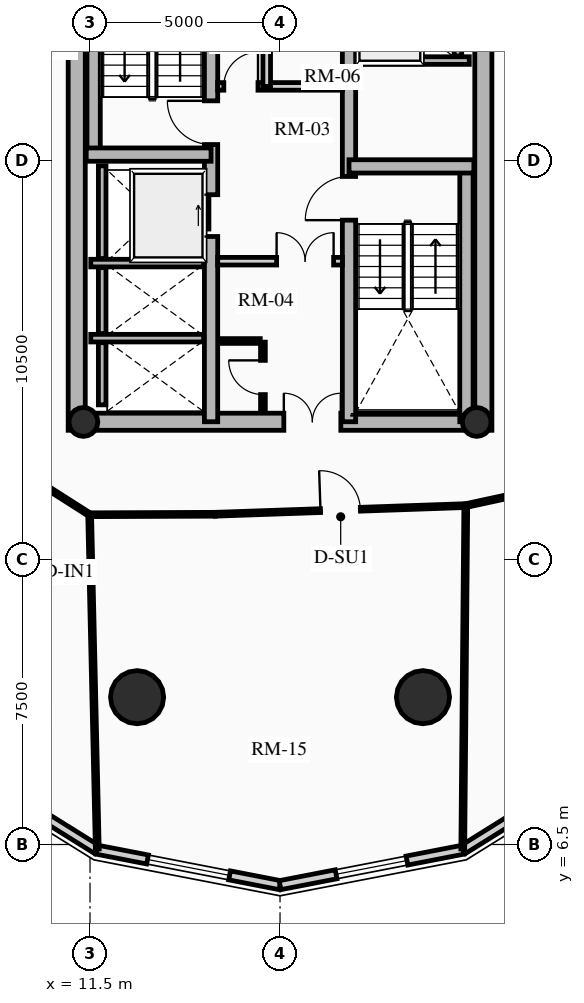
"""IFC4 building model, lengths in metres.
Left out: names, types, materials, properties, quantities, classifications, styles, units other than length and angle.
Written with IfcOpenShell. Run it as: python <this file> out.ifc"""

import sys

from ifc_helpers import new_model, si_unit, direction, frame, frame_2d, origin, origin_2d, place, context, subcontext, project, spatial, rectangle, circle, hollow_circle, extrude, source, transform, mapped, element, fill, save


model = new_model("IFC4")
c1 = context("Model", 3, precision=1e-05, world=origin(), true_north=direction((0.0, 1.0)))
c2 = subcontext(c1, "Body", "Model", "MODEL_VIEW")
j1 = project(units=[si_unit("LENGTHUNIT", "METRE"), si_unit("PLANEANGLEUNIT", "RADIAN")], contexts=[c1])
p1 = place(None, origin())
s1 = spatial("IfcSite", under=j1, at=p1, CompositionType="ELEMENT")
p2 = place(p1, origin())
s2 = spatial("IfcBuilding", under=s1, at=p2, CompositionType="ELEMENT")
p3 = place(p2, frame((0.0, 0.0, 99.25)))
s3 = spatial("IfcBuildingStorey", under=s2, at=p3, CompositionType="ELEMENT", Elevation=99.25)
for number, where, z_axis, x_axis in (
    (1, (11.15, 17.4, 0.0), (0.0, 0.0, 1.0), (0.0, 1.0, 0.0)),
    (2, (21.85, 17.4, 0.0), (0.0, 0.0, 1.0), (0.0, 1.0, 0.0)),
):
    element("IfcWall", number, at=place(p3, frame(where, z_axis=z_axis, x_axis=x_axis)), inside=s3, PredefinedType="SHEAR", context=c2, shape_type="SweptSolid", body=[
        extrude(rectangle(XDim=14.2, YDim=0.45, at=frame_2d((7.1, 0.0))), origin(), (0.0, 0.0, 1.0), 2.91),
    ])
p4 = place(p3, frame((11.15, 17.625, 0.0), z_axis=(0.0, 0.0, 1.0), x_axis=(1.0, 0.0, 0.0)))
e3 = element("IfcWall", 3, at=p4, inside=s3, PredefinedType="SHEAR", context=c2, shape_type="SweptSolid", body=[
    extrude(rectangle(XDim=10.7, YDim=0.45, at=frame_2d((5.35, 0.0))), origin(), (0.0, 0.0, 1.0), 2.91),
])
m1 = source(origin(), c2, "Body", "SweptSolid", [
    extrude(rectangle(XDim=1.5, YDim=2.02, at=frame_2d((0.75, 1.01))), frame((0.0, 0.235, 0.0), z_axis=(0.0, -1.0, 0.0), x_axis=(1.0, 0.0, 0.0)), (0.0, 0.0, 1.0), 0.47),
])
p5 = place(p4, frame((5.45, 0.0, 0.0)))
e4 = element("IfcOpeningElement", 4, at=p5, cuts=e3, PredefinedType="OPENING", context=c2, shape_type="MappedRepresentation", body=[
    mapped(m1, transform((0.0, 0.0, 0.0), x_axis=(1.0, 0.0, 0.0), y_axis=(0.0, 1.0, 0.0), z_axis=(0.0, 0.0, 1.0), scale=1.0)),
])
p6 = place(p3, frame((14.685, 17.625, 0.0), z_axis=(0.0, 0.0, 1.0), x_axis=(0.0, 1.0, 0.0)))
e5 = element("IfcWall", 5, at=p6, inside=s3, PredefinedType="SHEAR", context=c2, shape_type="SweptSolid", body=[
    extrude(rectangle(XDim=13.75, YDim=0.35, at=frame_2d((6.875, 0.0))), origin(), (0.0, 0.0, 1.0), 2.91),
])
m2 = source(origin(), c2, "Body", "SweptSolid", [
    extrude(rectangle(XDim=1.1, YDim=2.015, at=frame_2d((0.55, 1.007))), frame((0.0, 0.185, 0.0), z_axis=(0.0, -1.0, 0.0), x_axis=(1.0, 0.0, 0.0)), (0.0, 0.0, 1.0), 0.37),
])
p7 = place(p6, frame((4.875, 0.0, 0.0)))
e6 = element("IfcOpeningElement", 6, at=p7, cuts=e5, PredefinedType="OPENING", context=c2, shape_type="MappedRepresentation", body=[
    mapped(m2, transform((0.0, 0.0, 0.0), x_axis=(1.0, 0.0, 0.0), y_axis=(0.0, 1.0, 0.0), z_axis=(0.0, 0.0, 1.0), scale=1.0)),
])
m3 = source(origin(), c2, "Body", "SweptSolid", [
    extrude(rectangle(XDim=1.15, YDim=2.02, at=frame_2d((0.575, 1.01))), frame((0.0, 0.185, 0.0), z_axis=(0.0, -1.0, 0.0), x_axis=(1.0, 0.0, 0.0)), (0.0, 0.0, 1.0), 0.37),
])
p8 = place(p6, frame((7.295, 0.0, 0.0)))
e7 = element("IfcOpeningElement", 7, at=p8, cuts=e5, PredefinedType="OPENING", context=c2, shape_type="MappedRepresentation", body=[
    mapped(m3, transform((0.0, 0.0, 0.0), x_axis=(1.0, 0.0, 0.0), y_axis=(0.0, 1.0, 0.0), z_axis=(0.0, 0.0, 1.0), scale=1.0)),
])
p9 = place(p3, frame((18.315, 17.625, 0.0), z_axis=(0.0, 0.0, 1.0), x_axis=(0.0, 1.0, 0.0)))
e8 = element("IfcWall", 8, at=p9, inside=s3, PredefinedType="SHEAR", context=c2, shape_type="SweptSolid", body=[
    extrude(rectangle(XDim=13.75, YDim=0.35, at=frame_2d((6.875, 0.0))), origin(), (0.0, 0.0, 1.0), 2.91),
])
p10 = place(p9, frame((10.0, 0.0, 0.0)))
e9 = element("IfcOpeningElement", 9, at=p10, cuts=e8, PredefinedType="OPENING", context=c2, shape_type="MappedRepresentation", body=[
    mapped(m2, transform((0.0, 0.0, 0.0), x_axis=(1.0, 0.0, 0.0), y_axis=(0.0, 1.0, 0.0), z_axis=(0.0, 0.0, 1.0), scale=1.0)),
])
p11 = place(p9, frame((12.0, 0.0, 0.0)))
e10 = element("IfcOpeningElement", 10, at=p11, cuts=e8, PredefinedType="OPENING", context=c2, shape_type="MappedRepresentation", body=[
    mapped(m2, transform((0.0, 0.0, 0.0), x_axis=(1.0, 0.0, 0.0), y_axis=(0.0, 1.0, 0.0), z_axis=(0.0, 0.0, 1.0), scale=1.0)),
])
p12 = place(p9, frame((5.305, 0.0, 0.0)))
e11 = element("IfcOpeningElement", 11, at=p12, cuts=e8, PredefinedType="OPENING", context=c2, shape_type="MappedRepresentation", body=[
    mapped(m3, transform((0.0, 0.0, 0.0), x_axis=(1.0, 0.0, 0.0), y_axis=(0.0, 1.0, 0.0), z_axis=(0.0, 0.0, 1.0), scale=1.0)),
])
p13 = place(p3, frame((11.595, 24.655, 0.0), z_axis=(0.0, 0.0, 1.0), x_axis=(0.0, 1.0, 0.0)))
e12 = element("IfcWall", 12, at=p13, inside=s3, PredefinedType="SHEAR", context=c2, shape_type="SweptSolid", body=[
    extrude(rectangle(XDim=6.72, YDim=0.35, at=frame_2d((3.36, 0.0))), origin(), (0.0, 0.0, 1.0), 2.91),
])
p14 = place(p3, frame((11.4, 24.655, 0.0), z_axis=(0.0, 0.0, 1.0), x_axis=(1.0, 0.0, 0.0)))
e13 = element("IfcWall", 13, at=p14, inside=s3, PredefinedType="SHEAR", context=c2, shape_type="SweptSolid", body=[
    extrude(rectangle(XDim=3.285, YDim=0.35, at=frame_2d((1.643, 0.0))), origin(), (0.0, 0.0, 1.0), 2.91),
])
p15 = place(p3, frame((21.405, 17.625, 0.0), z_axis=(0.0, 0.0, 1.0), x_axis=(0.0, 1.0, 0.0)))
e14 = element("IfcWall", 14, at=p15, inside=s3, PredefinedType="SHEAR", context=c2, shape_type="SweptSolid", body=[
    extrude(rectangle(XDim=6.72, YDim=0.35, at=frame_2d((3.36, 0.0))), origin(), (0.0, 0.0, 1.0), 2.91),
])
p16 = place(p3, frame((18.315, 24.345, 0.0), z_axis=(0.0, 0.0, 1.0), x_axis=(1.0, 0.0, 0.0)))
e15 = element("IfcWall", 15, at=p16, inside=s3, PredefinedType="SHEAR", context=c2, shape_type="SweptSolid", body=[
    extrude(rectangle(XDim=3.285, YDim=0.35, at=frame_2d((1.643, 0.0))), origin(), (0.0, 0.0, 1.0), 2.91),
])
for number, where, z_axis, x_axis in (
    (16, (11.325, 17.62, 0.0), (0.0, 0.0, 1.0), (1.0, 0.0, 0.0)),
    (17, (21.675, 17.62, 0.0), (0.0, 0.0, 1.0), (1.0, 0.0, 0.0)),
):
    element("IfcColumn", number, at=place(p3, frame(where, z_axis=z_axis, x_axis=x_axis)), inside=s3, PredefinedType="COLUMN", context=c2, shape_type="SweptSolid", body=[
        extrude(hollow_circle(Radius=0.38, WallThickness=0.032, at=origin_2d()), origin(), (0.0, 0.0, 1.0), 2.91),
    ])
for number, where, z_axis, x_axis in (
    (18, (12.739, 10.377, 0.0), (0.0, 0.0, 1.0), (1.0, 0.0, 0.0)),
    (19, (20.261, 10.377, 0.0), (0.0, 0.0, 1.0), (1.0, 0.0, 0.0)),
):
    element("IfcColumn", number, at=place(p3, frame(where, z_axis=z_axis, x_axis=x_axis)), inside=s3, PredefinedType="USERDEFINED", context=c2, shape_type="SweptSolid", body=[
        extrude(circle(Radius=0.7, at=origin_2d()), origin(), (0.0, 0.0, 1.0), 2.91),
    ])
p17 = place(p3, frame((11.685, 6.363, 0.0), z_axis=(0.0, 0.0, 1.0), x_axis=(-0.848520380187, 0.529162701263, 0.0)))
e20 = element("IfcWall", 20, at=p17, inside=s3, PredefinedType="SOLIDWALL", context=c2, shape_type="SweptSolid", body=[
    extrude(rectangle(XDim=5.119, YDim=0.24, at=frame_2d((2.56, 0.0))), origin(), (0.0, 0.0, 1.0), 2.179),
])
m4 = source(origin(), c2, "Body", "SweptSolid", [
    extrude(rectangle(XDim=1.9, YDim=1.35, at=frame_2d((0.95, 0.675))), frame((0.0, 0.13, 0.0), z_axis=(0.0, -1.0, 0.0), x_axis=(1.0, 0.0, 0.0)), (0.0, 0.0, 1.0), 0.26),
])
p18 = place(p17, frame((1.609, 0.0, 0.65)))
e21 = element("IfcOpeningElement", 21, at=p18, cuts=e20, PredefinedType="OPENING", context=c2, shape_type="MappedRepresentation", body=[
    mapped(m4, transform((0.0, 0.0, 0.0), x_axis=(1.0, 0.0, 0.0), y_axis=(0.0, 1.0, 0.0), z_axis=(0.0, 0.0, 1.0), scale=1.0)),
])
p19 = place(p3, frame((16.5, 5.43, 0.0), z_axis=(0.0, 0.0, 1.0), x_axis=(-0.981723785992, 0.190311344954, 0.0)))
e22 = element("IfcWall", 22, at=p19, inside=s3, PredefinedType="SOLIDWALL", context=c2, shape_type="SweptSolid", body=[
    extrude(rectangle(XDim=4.904, YDim=0.24, at=frame_2d((2.452, 0.0))), origin(), (0.0, 0.0, 1.0), 2.179),
])
m5 = source(origin(), c2, "Body", "SweptSolid", [
    extrude(rectangle(XDim=2.2, YDim=1.35, at=frame_2d((1.1, 0.675))), frame((0.0, 0.13, 0.0), z_axis=(0.0, -1.0, 0.0), x_axis=(1.0, 0.0, 0.0)), (0.0, 0.0, 1.0), 0.26),
])
p20 = place(p19, frame((1.352, 0.0, 0.65)))
e23 = element("IfcOpeningElement", 23, at=p20, cuts=e22, PredefinedType="OPENING", context=c2, shape_type="MappedRepresentation", body=[
    mapped(m5, transform((0.0, 0.0, 0.0), x_axis=(1.0, 0.0, 0.0), y_axis=(0.0, 1.0, 0.0), z_axis=(0.0, 0.0, 1.0), scale=1.0)),
])
p21 = place(p3, frame((21.315, 6.363, 0.0), z_axis=(0.0, 0.0, 1.0), x_axis=(-0.981723785992, -0.190311344954, 0.0)))
e24 = element("IfcWall", 24, at=p21, inside=s3, PredefinedType="SOLIDWALL", context=c2, shape_type="SweptSolid", body=[
    extrude(rectangle(XDim=4.904, YDim=0.24, at=frame_2d((2.452, 0.0))), origin(), (0.0, 0.0, 1.0), 2.179),
])
p22 = place(p21, frame((1.502, 0.0, 0.65)))
e25 = element("IfcOpeningElement", 25, at=p22, cuts=e24, PredefinedType="OPENING", context=c2, shape_type="MappedRepresentation", body=[
    mapped(m4, transform((0.0, 0.0, 0.0), x_axis=(1.0, 0.0, 0.0), y_axis=(0.0, 1.0, 0.0), z_axis=(0.0, 0.0, 1.0), scale=1.0)),
])
p23 = place(p3, frame((25.658, 9.072, 0.0), z_axis=(0.0, 0.0, 1.0), x_axis=(-0.848520380187, -0.529162701263, 0.0)))
e26 = element("IfcWall", 26, at=p23, inside=s3, PredefinedType="SOLIDWALL", context=c2, shape_type="SweptSolid", body=[
    extrude(rectangle(XDim=5.119, YDim=0.24, at=frame_2d((2.56, 0.0))), origin(), (0.0, 0.0, 1.0), 2.179),
])
p24 = place(p3, frame((11.52, 21.8, 0.0), z_axis=(0.0, 0.0, 1.0), x_axis=(1.0, 0.0, 0.0)))
e27 = element("IfcWall", 27, at=p24, inside=s3, PredefinedType="SHEAR", context=c2, shape_type="SweptSolid", body=[
    extrude(rectangle(XDim=2.97, YDim=0.2, at=frame_2d((1.485, 0.0))), origin(), (0.0, 0.0, 1.0), 2.91),
])
p25 = place(p3, frame((11.82, 21.92, 0.0), z_axis=(0.0, 0.0, 1.0), x_axis=(0.0, 1.0, 0.0)))
e28 = element("IfcWall", 28, at=p25, inside=s3, PredefinedType="SHEAR", context=c2, shape_type="SweptSolid", body=[
    extrude(rectangle(XDim=2.44, YDim=0.2, at=frame_2d((1.22, 0.0))), origin(), (0.0, 0.0, 1.0), 2.91),
])
p26 = place(p3, frame((11.52, 19.825, 0.0), z_axis=(0.0, 0.0, 1.0), x_axis=(1.0, 0.0, 0.0)))
e29 = element("IfcWall", 29, at=p26, inside=s3, PredefinedType="SHEAR", context=c2, shape_type="SweptSolid", body=[
    extrude(rectangle(XDim=2.97, YDim=0.2, at=frame_2d((1.485, 0.0))), origin(), (0.0, 0.0, 1.0), 2.91),
])
p27 = place(p3, frame((11.82, 19.945, 0.0), z_axis=(0.0, 0.0, 1.0), x_axis=(0.0, 1.0, 0.0)))
e30 = element("IfcWall", 30, at=p27, inside=s3, PredefinedType="SHEAR", context=c2, shape_type="SweptSolid", body=[
    extrude(rectangle(XDim=1.735, YDim=0.2, at=frame_2d((0.867, 0.0))), origin(), (0.0, 0.0, 1.0), 2.91),
])
p28 = place(p3, frame((11.82, 18.07, 0.0), z_axis=(0.0, 0.0, 1.0), x_axis=(0.0, 1.0, 0.0)))
e31 = element("IfcWall", 31, at=p28, inside=s3, PredefinedType="SHEAR", context=c2, shape_type="SweptSolid", body=[
    extrude(rectangle(XDim=1.635, YDim=0.2, at=frame_2d((0.817, 0.0))), origin(), (0.0, 0.0, 1.0), 2.91),
])
p29 = place(p3, frame((18.51, 27.13, 0.0), z_axis=(0.0, 0.0, 1.0), x_axis=(1.0, 0.0, 0.0)))
e32 = element("IfcWall", 32, at=p29, inside=s3, PredefinedType="SHEAR", context=c2, shape_type="SweptSolid", body=[
    extrude(rectangle(XDim=2.97, YDim=0.2, at=frame_2d((1.485, 0.0))), origin(), (0.0, 0.0, 1.0), 2.91),
])
p30 = place(p3, frame((21.18, 27.25, 0.0), z_axis=(0.0, 0.0, 1.0), x_axis=(0.0, 1.0, 0.0)))
e33 = element("IfcWall", 33, at=p30, inside=s3, PredefinedType="SHEAR", context=c2, shape_type="SweptSolid", body=[
    extrude(rectangle(XDim=1.805, YDim=0.2, at=frame_2d((0.902, 0.0))), origin(), (0.0, 0.0, 1.0), 2.91),
])
p31 = place(p3, frame((14.86, 21.85, 0.0), z_axis=(0.0, 0.0, 1.0), x_axis=(1.0, 0.0, 0.0)))
e34 = element("IfcWall", 34, at=p31, inside=s3, PredefinedType="PARTITIONING", context=c2, shape_type="SweptSolid", body=[
    extrude(rectangle(XDim=3.28, YDim=0.2, at=frame_2d((1.64, 0.0))), origin(), (0.0, 0.0, 1.0), 2.655),
])
m6 = source(origin(), c2, "Body", "SweptSolid", [
    extrude(rectangle(XDim=1.5, YDim=2.02, at=frame_2d((0.75, 1.01))), frame((0.0, 0.11, 0.0), z_axis=(0.0, -1.0, 0.0), x_axis=(1.0, 0.0, 0.0)), (0.0, 0.0, 1.0), 0.22),
])
p32 = place(p31, frame((1.55, 0.0, 0.0)))
e35 = element("IfcOpeningElement", 35, at=p32, cuts=e34, PredefinedType="OPENING", context=c2, shape_type="MappedRepresentation", body=[
    mapped(m6, transform((0.0, 0.0, 0.0), x_axis=(1.0, 0.0, 0.0), y_axis=(0.0, 1.0, 0.0), z_axis=(0.0, 0.0, 1.0), scale=1.0)),
])
p33 = place(p3, frame((14.86, 26.45, 0.0), z_axis=(0.0, 0.0, 1.0), x_axis=(1.0, 0.0, 0.0)))
e36 = element("IfcWall", 36, at=p33, inside=s3, PredefinedType="PARTITIONING", context=c2, shape_type="SweptSolid", body=[
    extrude(rectangle(XDim=3.28, YDim=0.2, at=frame_2d((1.64, 0.0))), origin(), (0.0, 0.0, 1.0), 2.655),
])
m7 = source(origin(), c2, "Body", "SweptSolid", [
    extrude(rectangle(XDim=0.9, YDim=2.005, at=frame_2d((0.45, 1.002))), frame((0.0, 0.11, 0.0), z_axis=(0.0, -1.0, 0.0), x_axis=(1.0, 0.0, 0.0)), (0.0, 0.0, 1.0), 0.22),
])
p34 = place(p33, frame((0.16, 0.0, 0.0)))
e37 = element("IfcOpeningElement", 37, at=p34, cuts=e36, PredefinedType="OPENING", context=c2, shape_type="MappedRepresentation", body=[
    mapped(m7, transform((0.0, 0.0, 0.0), x_axis=(1.0, 0.0, 0.0), y_axis=(0.0, 1.0, 0.0), z_axis=(0.0, 0.0, 1.0), scale=1.0)),
])
p35 = place(p3, frame((16.15, 26.45, 0.0), z_axis=(0.0, 0.0, 1.0), x_axis=(0.0, 1.0, 0.0)))
e38 = element("IfcWall", 38, at=p35, inside=s3, PredefinedType="PARTITIONING", context=c2, shape_type="SweptSolid", body=[
    extrude(rectangle(XDim=2.4, YDim=0.2, at=frame_2d((1.2, 0.0))), origin(), (0.0, 0.0, 1.0), 2.655),
])
p36 = place(p3, frame((16.05, 17.92, 0.0), z_axis=(0.0, 0.0, 1.0), x_axis=(0.0, 1.0, 0.0)))
e39 = element("IfcWall", 39, at=p36, inside=s3, PredefinedType="PARTITIONING", context=c2, shape_type="SweptSolid", body=[
    extrude(rectangle(XDim=1.8, YDim=0.125, at=frame_2d((0.9, 0.0))), origin(), (0.0, 0.0, 1.0), 2.655),
])
m8 = source(origin(), c2, "Body", "SweptSolid", [
    extrude(rectangle(XDim=0.9, YDim=2.005, at=frame_2d((0.45, 1.002))), frame((0.0, 0.073, 0.0), z_axis=(0.0, -1.0, 0.0), x_axis=(1.0, 0.0, 0.0)), (0.0, 0.0, 1.0), 0.145),
])
p37 = place(p36, frame((0.42, 0.0, 0.0)))
e40 = element("IfcOpeningElement", 40, at=p37, cuts=e39, PredefinedType="OPENING", context=c2, shape_type="MappedRepresentation", body=[
    mapped(m8, transform((0.0, 0.0, 0.0), x_axis=(1.0, 0.0, 0.0), y_axis=(0.0, 1.0, 0.0), z_axis=(0.0, 0.0, 1.0), scale=1.0)),
])
p38 = place(p3, frame((14.88, 19.75, 0.0), z_axis=(0.0, 0.0, 1.0), x_axis=(1.0, 0.0, 0.0)))
e41 = element("IfcWall", 41, at=p38, inside=s3, PredefinedType="PARTITIONING", context=c2, shape_type="SweptSolid", body=[
    extrude(rectangle(XDim=1.1, YDim=0.125, at=frame_2d((0.55, 0.0))), origin(), (0.0, 0.0, 1.0), 2.655),
])
p39 = place(p3, frame((10.156, 16.029, 0.0), z_axis=(0.0, 0.0, 1.0), x_axis=(0.843127549493, -0.537713618282, 0.0)))
e42 = element("IfcWall", 42, at=p39, inside=s3, PredefinedType="MOVABLE", context=c2, shape_type="SweptSolid", body=[
    extrude(rectangle(XDim=1.583, YDim=0.1, at=frame_2d((0.792, 0.0))), origin(), (0.0, 0.0, 1.0), 2.225),
])
p40 = place(p3, frame((11.49, 15.178, 0.0), z_axis=(0.0, 0.0, 1.0), x_axis=(0.99999260582, 0.003845556538, 0.0)))
e43 = element("IfcWall", 43, at=p40, inside=s3, PredefinedType="MOVABLE", context=c2, shape_type="SweptSolid", body=[
    extrude(rectangle(XDim=3.301, YDim=0.1, at=frame_2d((1.651, 0.0))), origin(), (0.0, 0.0, 1.0), 2.225),
])
p41 = place(p3, frame((14.792, 15.191, 0.0), z_axis=(0.0, 0.0, 1.0), x_axis=(0.999405559957, 0.034475015985, 0.0)))
e44 = element("IfcWall", 44, at=p41, inside=s3, PredefinedType="MOVABLE", context=c2, shape_type="SweptSolid", body=[
    extrude(rectangle(XDim=6.6, YDim=0.1, at=frame_2d((3.3, 0.0))), origin(), (0.0, 0.0, 1.0), 2.225),
])
m9 = source(origin(), c2, "Body", "SweptSolid", [
    extrude(rectangle(XDim=1.05, YDim=2.015, at=frame_2d((0.525, 1.007))), frame((0.0, 0.06, 0.0), z_axis=(0.0, -1.0, 0.0), x_axis=(1.0, 0.0, 0.0)), (0.0, 0.0, 1.0), 0.12),
])
p42 = place(p41, frame((2.775, 0.0, 0.0)))
e45 = element("IfcOpeningElement", 45, at=p42, cuts=e44, PredefinedType="OPENING", context=c2, shape_type="MappedRepresentation", body=[
    mapped(m9, transform((0.0, 0.0, 0.0), x_axis=(1.0, 0.0, 0.0), y_axis=(0.0, 1.0, 0.0), z_axis=(0.0, 0.0, 1.0), scale=1.0)),
])
p43 = place(p3, frame((21.388, 15.418, 0.0), z_axis=(0.0, 0.0, 1.0), x_axis=(0.977297113048, 0.211873435874, 0.0)))
e46 = element("IfcWall", 46, at=p43, inside=s3, PredefinedType="MOVABLE", context=c2, shape_type="SweptSolid", body=[
    extrude(rectangle(XDim=1.877, YDim=0.1, at=frame_2d((0.938, 0.0))), origin(), (0.0, 0.0, 1.0), 2.225),
])
p44 = place(p3, frame((11.49, 15.178, 0.0), z_axis=(0.0, 0.0, 1.0), x_axis=(0.022838019925, -0.999739178409, 0.0)))
e47 = element("IfcWall", 47, at=p44, inside=s3, PredefinedType="MOVABLE", context=c2, shape_type="SweptSolid", body=[
    extrude(rectangle(XDim=8.798, YDim=0.1, at=frame_2d((4.399, 0.0))), origin(), (0.0, 0.0, 1.0), 2.179),
])
p45 = place(p3, frame((21.388, 15.418, 0.0), z_axis=(0.0, 0.0, 1.0), x_axis=(-0.008780834631, -0.999961447728, 0.0)))
e48 = element("IfcWall", 48, at=p45, inside=s3, PredefinedType="MOVABLE", context=c2, shape_type="SweptSolid", body=[
    extrude(rectangle(XDim=9.036, YDim=0.1, at=frame_2d((4.518, 0.0))), origin(), (0.0, 0.0, 1.0), 2.179),
])
m10 = source(origin(), c2, "Body", "SweptSolid", [
    extrude(rectangle(XDim=2.2, YDim=1.35, at=frame_2d((1.1, 0.675))), frame((0.0, 0.03, 0.0), z_axis=(0.0, -1.0, 0.0), x_axis=(1.0, 0.0, 0.0)), (0.0, 0.0, 1.0), 0.06),
])
p46 = place(p20, origin())
e49 = element("IfcWindow", 49, at=p46, inside=s3, PartitioningType="DOUBLE_PANEL_VERTICAL", PredefinedType="WINDOW", context=c2, shape_type="MappedRepresentation", body=[
    mapped(m10, transform((0.0, 0.0, 0.0), x_axis=(1.0, 0.0, 0.0), y_axis=(0.0, 1.0, 0.0), z_axis=(0.0, 0.0, 1.0), scale=1.0)),
])
fill(e23, e49)
m11 = source(origin(), c2, "Body", "SweptSolid", [
    extrude(rectangle(XDim=1.9, YDim=1.35, at=frame_2d((0.95, 0.675))), frame((0.0, 0.03, 0.0), z_axis=(0.0, -1.0, 0.0), x_axis=(1.0, 0.0, 0.0)), (0.0, 0.0, 1.0), 0.06),
])
p47 = place(p22, origin())
e50 = element("IfcWindow", 50, at=p47, inside=s3, PartitioningType="DOUBLE_PANEL_VERTICAL", PredefinedType="WINDOW", context=c2, shape_type="MappedRepresentation", body=[
    mapped(m11, transform((0.0, 0.0, 0.0), x_axis=(1.0, 0.0, 0.0), y_axis=(0.0, 1.0, 0.0), z_axis=(0.0, 0.0, 1.0), scale=1.0)),
])
fill(e25, e50)
m12 = source(origin(), c2, "Body", "SweptSolid", [
    extrude(rectangle(XDim=1.1, YDim=2.015, at=frame_2d((0.55, 1.007))), frame((0.0, 0.025, 0.0), z_axis=(0.0, -1.0, 0.0), x_axis=(1.0, 0.0, 0.0)), (0.0, 0.0, 1.0), 0.05),
])
p48 = place(p7, origin())
e51 = element("IfcDoor", 51, at=p48, inside=s3, OperationType="SLIDING_TO_RIGHT", PredefinedType="DOOR", context=c2, shape_type="MappedRepresentation", body=[
    mapped(m12, transform((0.0, 0.0, 0.0), x_axis=(1.0, 0.0, 0.0), y_axis=(0.0, 1.0, 0.0), z_axis=(0.0, 0.0, 1.0), scale=1.0)),
])
fill(e6, e51)
m13 = source(origin(), c2, "Body", "SweptSolid", [
    extrude(rectangle(XDim=1.15, YDim=2.02, at=frame_2d((0.575, 1.01))), frame((0.0, 0.025, 0.0), z_axis=(0.0, -1.0, 0.0), x_axis=(1.0, 0.0, 0.0)), (0.0, 0.0, 1.0), 0.05),
])
p49 = place(p8, origin())
e52 = element("IfcDoor", 52, at=p49, inside=s3, OperationType="SINGLE_SWING_RIGHT", PredefinedType="DOOR", context=c2, shape_type="MappedRepresentation", body=[
    mapped(m13, transform((0.0, 0.0, 0.0), x_axis=(1.0, 0.0, 0.0), y_axis=(0.0, 1.0, 0.0), z_axis=(0.0, 0.0, 1.0), scale=1.0)),
])
fill(e7, e52)
p50 = place(p12, origin())
e53 = element("IfcDoor", 53, at=p50, inside=s3, OperationType="SINGLE_SWING_LEFT", PredefinedType="DOOR", context=c2, shape_type="MappedRepresentation", body=[
    mapped(m13, transform((0.0, 0.0, 0.0), x_axis=(1.0, 0.0, 0.0), y_axis=(0.0, 1.0, 0.0), z_axis=(0.0, 0.0, 1.0), scale=1.0)),
])
fill(e11, e53)
m14 = source(origin(), c2, "Body", "SweptSolid", [
    extrude(rectangle(XDim=1.5, YDim=2.02, at=frame_2d((0.75, 1.01))), frame((0.0, 0.025, 0.0), z_axis=(0.0, -1.0, 0.0), x_axis=(1.0, 0.0, 0.0)), (0.0, 0.0, 1.0), 0.05),
])
p51 = place(p5, origin())
e54 = element("IfcDoor", 54, at=p51, inside=s3, OperationType="DOUBLE_DOOR_SINGLE_SWING", PredefinedType="DOOR", context=c2, shape_type="MappedRepresentation", body=[
    mapped(m14, transform((0.0, 0.0, 0.0), x_axis=(1.0, 0.0, 0.0), y_axis=(0.0, 1.0, 0.0), z_axis=(0.0, 0.0, 1.0), scale=1.0)),
])
fill(e4, e54)
p52 = place(p32, origin())
e55 = element("IfcDoor", 55, at=p52, inside=s3, OperationType="DOUBLE_DOOR_SINGLE_SWING", PredefinedType="DOOR", context=c2, shape_type="MappedRepresentation", body=[
    mapped(m14, transform((0.0, 0.0, 0.0), x_axis=(1.0, 0.0, 0.0), y_axis=(0.0, 1.0, 0.0), z_axis=(0.0, 0.0, 1.0), scale=1.0)),
])
fill(e35, e55)
m15 = source(origin(), c2, "Body", "SweptSolid", [
    extrude(rectangle(XDim=0.9, YDim=2.005, at=frame_2d((0.45, 1.002))), frame((0.0, 0.025, 0.0), z_axis=(0.0, -1.0, 0.0), x_axis=(1.0, 0.0, 0.0)), (0.0, 0.0, 1.0), 0.05),
])
p53 = place(p34, origin())
e56 = element("IfcDoor", 56, at=p53, inside=s3, OperationType="SINGLE_SWING_RIGHT", PredefinedType="DOOR", context=c2, shape_type="MappedRepresentation", body=[
    mapped(m15, transform((0.0, 0.0, 0.0), x_axis=(1.0, 0.0, 0.0), y_axis=(0.0, 1.0, 0.0), z_axis=(0.0, 0.0, 1.0), scale=1.0)),
])
fill(e37, e56)
p54 = place(p37, origin())
e57 = element("IfcDoor", 57, at=p54, inside=s3, OperationType="SINGLE_SWING_RIGHT", PredefinedType="DOOR", context=c2, shape_type="MappedRepresentation", body=[
    mapped(m15, transform((0.0, 0.0, 0.0), x_axis=(1.0, 0.0, 0.0), y_axis=(0.0, 1.0, 0.0), z_axis=(0.0, 0.0, 1.0), scale=1.0)),
])
fill(e40, e57)
m16 = source(origin(), c2, "Body", "SweptSolid", [
    extrude(rectangle(XDim=1.05, YDim=2.015, at=frame_2d((0.525, 1.007))), frame((0.0, 0.025, 0.0), z_axis=(0.0, -1.0, 0.0), x_axis=(1.0, 0.0, 0.0)), (0.0, 0.0, 1.0), 0.05),
])
p55 = place(p42, origin())
e58 = element("IfcDoor", 58, at=p55, inside=s3, OperationType="SINGLE_SWING_LEFT", PredefinedType="DOOR", context=c2, shape_type="MappedRepresentation", body=[
    mapped(m16, transform((0.0, 0.0, 0.0), x_axis=(1.0, 0.0, 0.0), y_axis=(0.0, 1.0, 0.0), z_axis=(0.0, 0.0, 1.0), scale=1.0)),
])
fill(e45, e58)
save(model, sys.argv[1])
